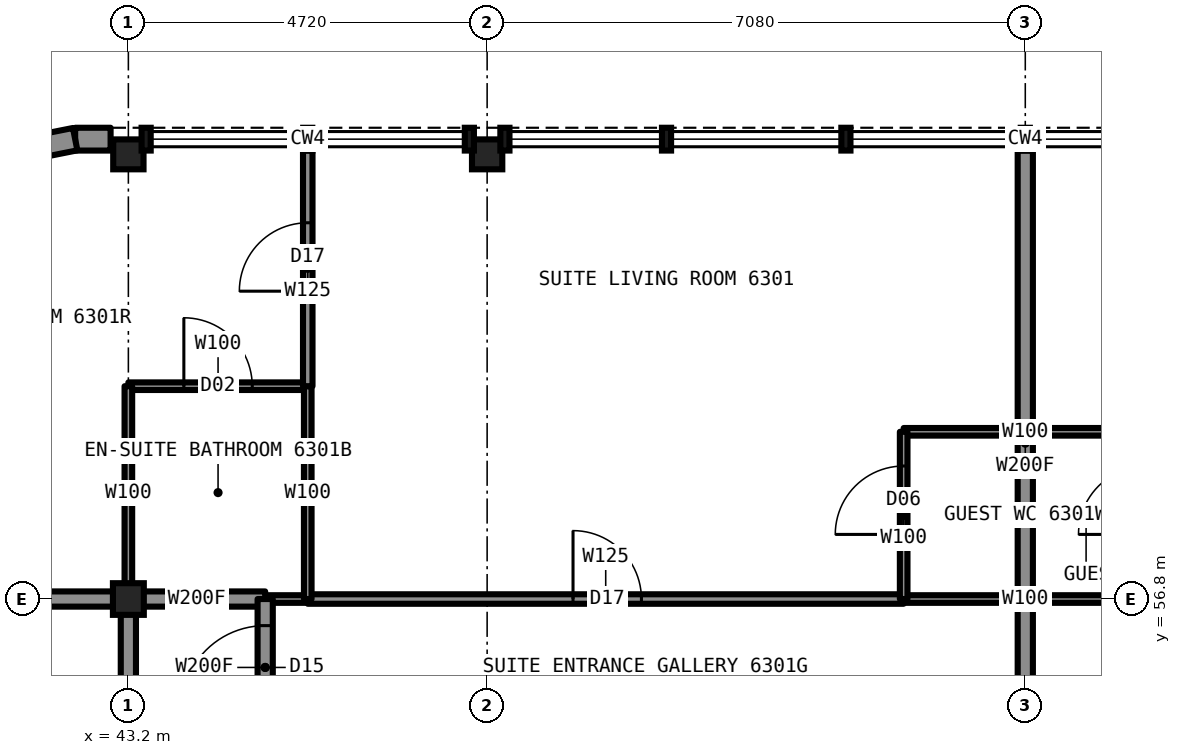
"""IFC4 building model, lengths in metres.
Left out: names, types, materials, properties, quantities, classifications, styles, units other than length and angle.
Written with IfcOpenShell. Run it as: python <this file> out.ifc"""

import sys

from ifc_helpers import new_model, si_unit, direction, frame, frame_2d, origin, origin_2d, place, context, subcontext, project, spatial, rectangle, i_section, extrude, element, fill, save


model = new_model("IFC4")
c1 = context("Model", 3, precision=1e-05, world=origin(), true_north=direction((0.0, 1.0)))
c2 = subcontext(c1, "Body", "Model", "MODEL_VIEW")
j1 = project(units=[si_unit("LENGTHUNIT", "METRE"), si_unit("PLANEANGLEUNIT", "RADIAN")], contexts=[c1])
p1 = place(None, origin())
s1 = spatial("IfcSite", under=j1, at=p1, CompositionType="ELEMENT")
p2 = place(p1, origin())
s2 = spatial("IfcBuilding", under=s1, at=p2, CompositionType="ELEMENT")
p3 = place(p2, frame((0.0, 0.0, 226.7)))
s3 = spatial("IfcBuildingStorey", under=s2, at=p3, CompositionType="ELEMENT", Elevation=226.7)
for number, where, z_axis, x_axis in (
    (1, (43.2, 62.65, 0.0), (0.0, 0.0, 1.0), (1.0, 0.0, 0.0)),
    (2, (47.92, 62.65, 0.0), (0.0, 0.0, 1.0), (1.0, 0.0, 0.0)),
):
    element("IfcColumn", number, at=place(p3, frame(where, z_axis=z_axis, x_axis=x_axis)), inside=s3, PredefinedType="COLUMN", context=c2, shape_type="SweptSolid", body=[
        extrude(i_section(OverallWidth=0.442, OverallDepth=0.531, WebThickness=0.066, FlangeThickness=0.106, at=origin_2d()), origin(), (0.0, 0.0, 1.0), 3.5),
    ])
p4 = place(p3, frame((43.2, 56.8, 0.0), z_axis=(0.0, 0.0, 1.0), x_axis=(1.0, 0.0, 0.0)))
e3 = element("IfcColumn", 3, at=p4, inside=s3, PredefinedType="COLUMN", context=c2, shape_type="SweptSolid", body=[
    extrude(i_section(OverallWidth=0.406, OverallDepth=0.417, WebThickness=0.03, FlangeThickness=0.048, at=origin_2d()), origin(), (0.0, 0.0, 1.0), 3.5),
])
p5 = place(p3, frame((45.0, 56.8, 0.0), z_axis=(0.0, 0.0, 1.0), x_axis=(1.0, 0.0, 0.0)))
e4 = element("IfcWall", 4, at=p5, inside=s3, PredefinedType="PARTITIONING", context=c2, shape_type="SweptSolid", body=[
    extrude(rectangle(XDim=0.56, YDim=0.1, at=frame_2d((0.28, 0.0))), origin(), (0.0, 0.0, 1.0), 3.33),
])
p6 = place(p3, frame((53.4, 56.8, 0.0), z_axis=(0.0, 0.0, 1.0), x_axis=(1.0, 0.0, 0.0)))
e5 = element("IfcWall", 5, at=p6, inside=s3, PredefinedType="PARTITIONING", context=c2, shape_type="SweptSolid", body=[
    extrude(rectangle(XDim=3.2, YDim=0.1, at=frame_2d((1.6, 0.0))), origin(), (0.0, 0.0, 1.0), 3.33),
])
p7 = place(p3, frame((43.2, 56.8, 0.0), z_axis=(0.0, 0.0, 1.0), x_axis=(1.0, 0.0, 0.0)))
e6 = element("IfcWall", 6, at=p7, inside=s3, PredefinedType="PARTITIONING", context=c2, shape_type="SweptSolid", body=[
    extrude(rectangle(XDim=1.8, YDim=0.2, at=frame_2d((0.9, 0.0))), origin(), (0.0, 0.0, 1.0), 3.33),
])
p8 = place(p3, frame((37.3, 56.8, 0.0), z_axis=(0.0, 0.0, 1.0), x_axis=(1.0, 0.0, 0.0)))
e7 = element("IfcWall", 7, at=p8, inside=s3, PredefinedType="PARTITIONING", context=c2, shape_type="SweptSolid", body=[
    extrude(rectangle(XDim=5.9, YDim=0.2, at=frame_2d((2.95, 0.0))), origin(), (0.0, 0.0, 1.0), 2.573),
])
p9 = place(p3, frame((45.56, 56.8, 0.0), z_axis=(0.0, 0.0, 1.0), x_axis=(1.0, 0.0, 0.0)))
e8 = element("IfcWall", 8, at=p9, inside=s3, PredefinedType="PARTITIONING", context=c2, shape_type="SweptSolid", body=[
    extrude(rectangle(XDim=7.84, YDim=0.125, at=frame_2d((3.92, 0.0))), origin(), (0.0, 0.0, 1.0), 3.33),
])
p10 = place(p9, frame((3.49, 0.0, 0.0)))
e9 = element("IfcOpeningElement", 9, at=p10, cuts=e8, PredefinedType="OPENING", context=c2, shape_type="SweptSolid", body=[
    extrude(rectangle(XDim=0.9, YDim=2.2, at=frame_2d((0.45, 1.1))), frame((0.0, 0.073, 0.0), z_axis=(0.0, -1.0, 0.0), x_axis=(1.0, 0.0, 0.0)), (0.0, 0.0, 1.0), 0.145),
])
p11 = place(p3, frame((53.4, 59.0, 0.0), z_axis=(0.0, 0.0, 1.0), x_axis=(1.0, 0.0, 0.0)))
e10 = element("IfcWall", 10, at=p11, inside=s3, PredefinedType="PARTITIONING", context=c2, shape_type="SweptSolid", body=[
    extrude(rectangle(XDim=3.2, YDim=0.1, at=frame_2d((1.6, 0.0))), origin(), (0.0, 0.0, 1.0), 3.33),
])
p12 = place(p3, frame((43.2, 59.6, 0.0), z_axis=(0.0, 0.0, 1.0), x_axis=(1.0, 0.0, 0.0)))
e11 = element("IfcWall", 11, at=p12, inside=s3, PredefinedType="PARTITIONING", context=c2, shape_type="SweptSolid", body=[
    extrude(rectangle(XDim=2.36, YDim=0.1, at=frame_2d((1.18, 0.0))), origin(), (0.0, 0.0, 1.0), 3.33),
])
p13 = place(p12, frame((0.73, 0.0, 0.0)))
e12 = element("IfcOpeningElement", 12, at=p13, cuts=e11, PredefinedType="OPENING", context=c2, shape_type="SweptSolid", body=[
    extrude(rectangle(XDim=0.9, YDim=2.1, at=frame_2d((0.45, 1.05))), frame((0.0, 0.06, 0.0), z_axis=(0.0, -1.0, 0.0), x_axis=(1.0, 0.0, 0.0)), (0.0, 0.0, 1.0), 0.12),
])
p14 = place(p3, frame((53.4, 56.8, 0.0), z_axis=(0.0, 0.0, 1.0), x_axis=(0.0, 1.0, 0.0)))
e13 = element("IfcWall", 13, at=p14, inside=s3, PredefinedType="PARTITIONING", context=c2, shape_type="SweptSolid", body=[
    extrude(rectangle(XDim=2.2, YDim=0.1, at=frame_2d((1.1, 0.0))), origin(), (0.0, 0.0, 1.0), 3.33),
])
p15 = place(p14, frame((0.85, 0.0, 0.0)))
e14 = element("IfcOpeningElement", 14, at=p15, cuts=e13, PredefinedType="OPENING", context=c2, shape_type="SweptSolid", body=[
    extrude(rectangle(XDim=0.9, YDim=2.1, at=frame_2d((0.45, 1.05))), frame((0.0, 0.06, 0.0), z_axis=(0.0, -1.0, 0.0), x_axis=(1.0, 0.0, 0.0)), (0.0, 0.0, 1.0), 0.12),
])
p16 = place(p3, frame((45.0, 55.0, 0.0), z_axis=(0.0, 0.0, 1.0), x_axis=(0.0, 1.0, 0.0)))
e15 = element("IfcWall", 15, at=p16, inside=s3, PredefinedType="PARTITIONING", context=c2, shape_type="SweptSolid", body=[
    extrude(rectangle(XDim=1.8, YDim=0.2, at=frame_2d((0.9, 0.0))), origin(), (0.0, 0.0, 1.0), 3.33),
])
p17 = place(p16, frame((0.35, 0.0, 0.0)))
e16 = element("IfcOpeningElement", 16, at=p17, cuts=e15, PredefinedType="OPENING", context=c2, shape_type="SweptSolid", body=[
    extrude(rectangle(XDim=1.1, YDim=2.2, at=frame_2d((0.55, 1.1))), frame((0.0, 0.11, 0.0), z_axis=(0.0, -1.0, 0.0), x_axis=(1.0, 0.0, 0.0)), (0.0, 0.0, 1.0), 0.22),
])
p18 = place(p3, frame((43.2, 56.8, 0.0), z_axis=(0.0, 0.0, 1.0), x_axis=(0.0, 1.0, 0.0)))
e17 = element("IfcWall", 17, at=p18, inside=s3, PredefinedType="PARTITIONING", context=c2, shape_type="SweptSolid", body=[
    extrude(rectangle(XDim=2.8, YDim=0.1, at=frame_2d((1.4, 0.0))), origin(), (0.0, 0.0, 1.0), 2.573),
])
p19 = place(p3, frame((43.2, 33.2, 0.0), z_axis=(0.0, 0.0, 1.0), x_axis=(0.0, 1.0, 0.0)))
e18 = element("IfcWall", 18, at=p19, inside=s3, PredefinedType="PARTITIONING", context=c2, shape_type="SweptSolid", body=[
    extrude(rectangle(XDim=23.6, YDim=0.2, at=frame_2d((11.8, 0.0))), origin(), (0.0, 0.0, 1.0), 3.33),
])
p20 = place(p19, frame((8.85, 0.0, 0.0)))
e19 = element("IfcOpeningElement", 19, at=p20, cuts=e18, PredefinedType="OPENING", context=c2, shape_type="SweptSolid", body=[
    extrude(rectangle(XDim=1.1, YDim=2.2, at=frame_2d((0.55, 1.1))), frame((0.0, 0.11, 0.0), z_axis=(0.0, -1.0, 0.0), x_axis=(1.0, 0.0, 0.0)), (0.0, 0.0, 1.0), 0.22),
])
p21 = place(p19, frame((13.65, 0.0, 0.0)))
e20 = element("IfcOpeningElement", 20, at=p21, cuts=e18, PredefinedType="OPENING", context=c2, shape_type="SweptSolid", body=[
    extrude(rectangle(XDim=1.1, YDim=2.2, at=frame_2d((0.55, 1.1))), frame((0.0, 0.11, 0.0), z_axis=(0.0, -1.0, 0.0), x_axis=(1.0, 0.0, 0.0)), (0.0, 0.0, 1.0), 0.22),
])
p22 = place(p3, frame((45.56, 56.8, 0.0), z_axis=(0.0, 0.0, 1.0), x_axis=(0.0, 1.0, 0.0)))
e21 = element("IfcWall", 21, at=p22, inside=s3, PredefinedType="PARTITIONING", context=c2, shape_type="SweptSolid", body=[
    extrude(rectangle(XDim=2.8, YDim=0.1, at=frame_2d((1.4, 0.0))), origin(), (0.0, 0.0, 1.0), 3.33),
])
p23 = place(p3, frame((45.56, 59.6, 0.0), z_axis=(0.0, 0.0, 1.0), x_axis=(0.0, 1.0, 0.0)))
e22 = element("IfcWall", 22, at=p23, inside=s3, PredefinedType="PARTITIONING", context=c2, shape_type="SweptSolid", body=[
    extrude(rectangle(XDim=3.1, YDim=0.125, at=frame_2d((1.55, 0.0))), origin(), (0.0, 0.0, 1.0), 3.33),
])
p24 = place(p23, frame((1.25, 0.0, 0.0)))
e23 = element("IfcOpeningElement", 23, at=p24, cuts=e22, PredefinedType="OPENING", context=c2, shape_type="SweptSolid", body=[
    extrude(rectangle(XDim=0.9, YDim=2.2, at=frame_2d((0.45, 1.1))), frame((0.0, 0.073, 0.0), z_axis=(0.0, -1.0, 0.0), x_axis=(1.0, 0.0, 0.0)), (0.0, 0.0, 1.0), 0.145),
])
p25 = place(p3, frame((55.0, 55.0, 0.0), z_axis=(0.0, 0.0, 1.0), x_axis=(0.0, 1.0, 0.0)))
e24 = element("IfcWall", 24, at=p25, inside=s3, PredefinedType="PARTITIONING", context=c2, shape_type="SweptSolid", body=[
    extrude(rectangle(XDim=7.7, YDim=0.2, at=frame_2d((3.85, 0.0))), origin(), (0.0, 0.0, 1.0), 2.573),
])
p26 = place(p10, origin())
e25 = element("IfcDoor", 25, at=p26, inside=s3, OperationType="SINGLE_SWING_LEFT", PredefinedType="DOOR", context=c2, shape_type="SweptSolid", body=[
    extrude(rectangle(XDim=0.9, YDim=2.2, at=frame_2d((0.45, 1.1))), frame((0.0, 0.025, 0.0), z_axis=(0.0, -1.0, 0.0), x_axis=(1.0, 0.0, 0.0)), (0.0, 0.0, 1.0), 0.05),
])
fill(e9, e25)
p27 = place(p13, origin())
e26 = element("IfcDoor", 26, at=p27, inside=s3, OperationType="SINGLE_SWING_RIGHT", PredefinedType="DOOR", context=c2, shape_type="SweptSolid", body=[
    extrude(rectangle(XDim=0.9, YDim=2.1, at=frame_2d((0.45, 1.05))), frame((0.0, 0.025, 0.0), z_axis=(0.0, -1.0, 0.0), x_axis=(1.0, 0.0, 0.0)), (0.0, 0.0, 1.0), 0.05),
])
fill(e12, e26)
p28 = place(p17, origin())
e27 = element("IfcDoor", 27, at=p28, inside=s3, OperationType="SINGLE_SWING_LEFT", PredefinedType="DOOR", context=c2, shape_type="SweptSolid", body=[
    extrude(rectangle(XDim=1.1, YDim=2.2, at=frame_2d((0.55, 1.1))), frame((0.0, 0.025, 0.0), z_axis=(0.0, -1.0, 0.0), x_axis=(1.0, 0.0, 0.0)), (0.0, 0.0, 1.0), 0.05),
])
fill(e16, e27)
p29 = place(p24, origin())
e28 = element("IfcDoor", 28, at=p29, inside=s3, OperationType="SINGLE_SWING_LEFT", PredefinedType="DOOR", context=c2, shape_type="SweptSolid", body=[
    extrude(rectangle(XDim=0.9, YDim=2.2, at=frame_2d((0.45, 1.1))), frame((0.0, 0.025, 0.0), z_axis=(0.0, -1.0, 0.0), x_axis=(1.0, 0.0, 0.0)), (0.0, 0.0, 1.0), 0.05),
])
fill(e23, e28)
p30 = place(p15, origin())
e29 = element("IfcDoor", 29, at=p30, inside=s3, OperationType="SINGLE_SWING_LEFT", PredefinedType="DOOR", context=c2, shape_type="SweptSolid", body=[
    extrude(rectangle(XDim=0.9, YDim=2.1, at=frame_2d((0.45, 1.05))), frame((0.0, 0.025, 0.0), z_axis=(0.0, -1.0, 0.0), x_axis=(1.0, 0.0, 0.0)), (0.0, 0.0, 1.0), 0.05),
])
fill(e14, e29)
save(model, sys.argv[1])
